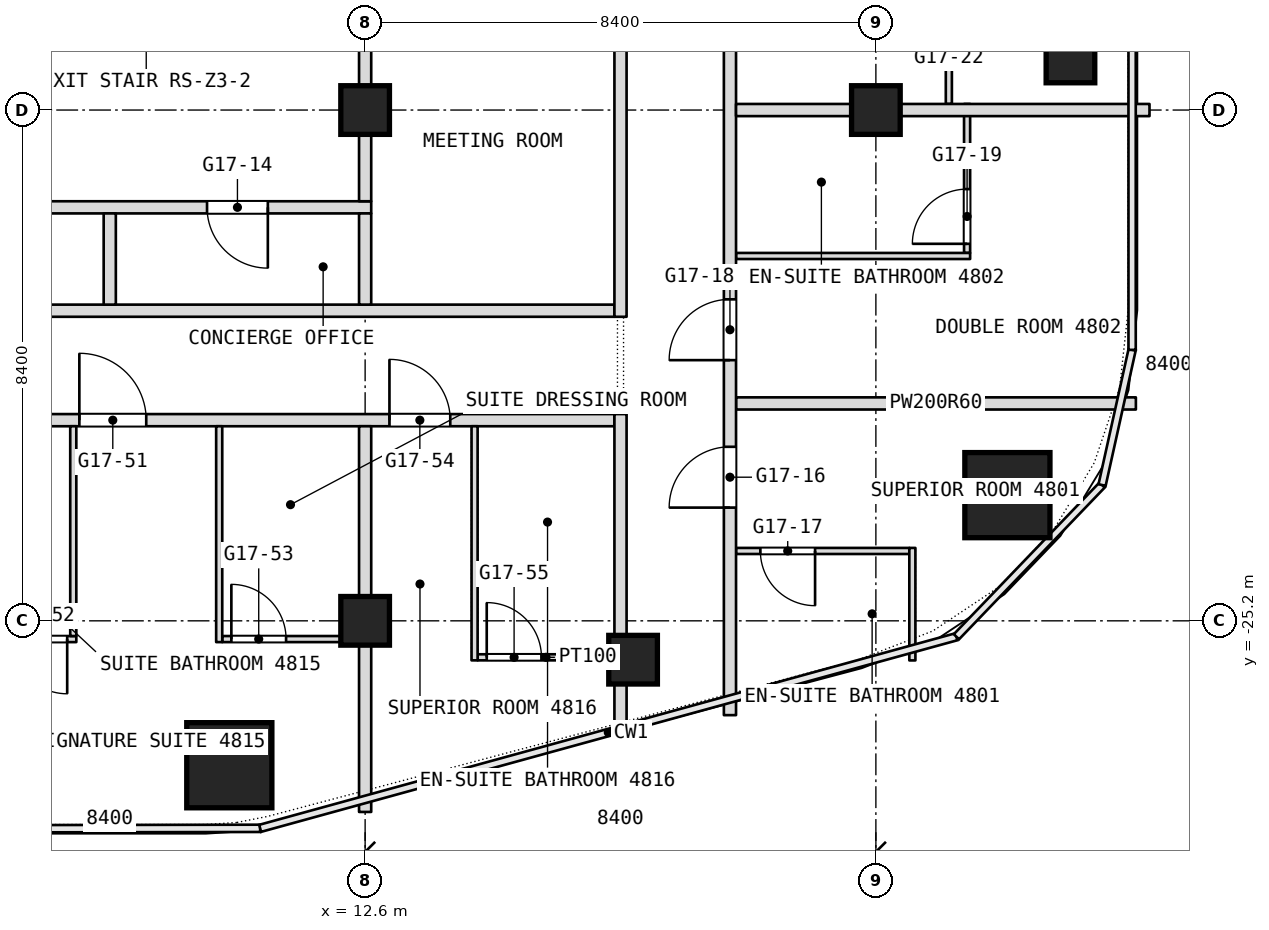
"""IFC4 building model, lengths in metres.
Left out: names, types, materials, properties, quantities, classifications, styles, units other than length and angle.
Written with IfcOpenShell. Run it as: python <this file> out.ifc"""

import sys

from ifc_helpers import new_model, si_unit, direction, frame, frame_2d, origin, origin_2d, place, context, subcontext, project, spatial, rectangle, extrude, element, fill, save


model = new_model("IFC4")
c1 = context("Model", 3, precision=1e-05, world=origin(), true_north=direction((0.0, 1.0)))
c2 = subcontext(c1, "Body", "Model", "MODEL_VIEW")
j1 = project(units=[si_unit("LENGTHUNIT", "METRE"), si_unit("PLANEANGLEUNIT", "RADIAN")], contexts=[c1])
p1 = place(None, origin())
s1 = spatial("IfcSite", under=j1, at=p1, CompositionType="ELEMENT")
p2 = place(p1, origin())
s2 = spatial("IfcBuilding", under=s1, at=p2, CompositionType="ELEMENT")
p3 = place(p2, frame((0.0, 0.0, 209.3)))
s3 = spatial("IfcBuildingStorey", under=s2, at=p3, CompositionType="ELEMENT", Elevation=209.3)
for number, where, z_axis, x_axis in (
    (1, (10.366, -27.575, 0.0), (0.0, 0.0, 1.0), (1.0, 0.0, 0.0)),
    (2, (23.163, -23.133, 0.0), (0.0, 0.0, 1.0), (1.0, 0.0, 0.0)),
):
    element("IfcColumn", number, at=place(p3, frame(where, z_axis=z_axis, x_axis=x_axis)), inside=s3, PredefinedType="COLUMN", context=c2, shape_type="SweptSolid", body=[
        extrude(rectangle(XDim=1.4, YDim=1.4, at=origin_2d()), origin(), (0.0, 0.0, 1.0), 3.6),
    ])
for number, where, z_axis, x_axis in (
    (3, (12.6, -25.2, 0.0), (0.0, 0.0, 1.0), (1.0, 0.0, 0.0)),
    (4, (12.6, -16.8, 0.0), (0.0, 0.0, 1.0), (1.0, 0.0, 0.0)),
    (5, (21.0, -16.8, 0.0), (0.0, 0.0, 1.0), (1.0, 0.0, 0.0)),
    (6, (24.2, -15.952, 0.0), (0.0, 0.0, 1.0), (1.0, 0.0, 0.0)),
    (7, (17.007, -25.839, 0.0), (0.0, 0.0, 1.0), (1.0, 0.0, 0.0)),
):
    element("IfcColumn", number, at=place(p3, frame(where, z_axis=z_axis, x_axis=x_axis)), inside=s3, PredefinedType="COLUMN", context=c2, shape_type="SweptSolid", body=[
        extrude(rectangle(XDim=0.8, YDim=0.8, at=origin_2d()), origin(), (0.0, 0.0, 1.0), 3.6),
    ])
p4 = place(p3, frame((14.45, -25.8, 0.0), z_axis=(0.0, 0.0, 1.0), x_axis=(1.0, 0.0, 0.0)))
e8 = element("IfcWall", 8, at=p4, inside=s3, PredefinedType="PARTITIONING", context=c2, shape_type="SweptSolid", body=[
    extrude(rectangle(XDim=2.25, YDim=0.1, at=frame_2d((1.125, 0.0))), origin(), (0.0, 0.0, 1.0), 3.34),
])
p5 = place(p4, frame((0.15, 0.0, 0.0)))
e9 = element("IfcOpeningElement", 9, at=p5, cuts=e8, PredefinedType="OPENING", context=c2, shape_type="SweptSolid", body=[
    extrude(rectangle(XDim=0.9, YDim=2.1, at=frame_2d((0.45, 1.05))), frame((0.0, 0.05, 0.0), z_axis=(0.0, -1.0, 0.0), x_axis=(1.0, 0.0, 0.0)), (0.0, 0.0, 1.0), 0.1),
])
p6 = place(p3, frame((4.3, -25.5, 0.0), z_axis=(0.0, 0.0, 1.0), x_axis=(1.0, 0.0, 0.0)))
e10 = element("IfcWall", 10, at=p6, inside=s3, PredefinedType="PARTITIONING", context=c2, shape_type="SweptSolid", body=[
    extrude(rectangle(XDim=3.55, YDim=0.1, at=frame_2d((1.775, 0.0))), origin(), (0.0, 0.0, 1.0), 3.34),
])
p7 = place(p6, frame((2.5, 0.0, 0.0)))
e11 = element("IfcOpeningElement", 11, at=p7, cuts=e10, PredefinedType="OPENING", context=c2, shape_type="SweptSolid", body=[
    extrude(rectangle(XDim=0.9, YDim=2.1, at=frame_2d((0.45, 1.05))), frame((0.0, 0.05, 0.0), z_axis=(0.0, -1.0, 0.0), x_axis=(1.0, 0.0, 0.0)), (0.0, 0.0, 1.0), 0.1),
])
p8 = place(p3, frame((10.25, -25.5, 0.0), z_axis=(0.0, 0.0, 1.0), x_axis=(1.0, 0.0, 0.0)))
e12 = element("IfcWall", 12, at=p8, inside=s3, PredefinedType="PARTITIONING", context=c2, shape_type="SweptSolid", body=[
    extrude(rectangle(XDim=2.45, YDim=0.1, at=frame_2d((1.225, 0.0))), origin(), (0.0, 0.0, 1.0), 3.34),
])
p9 = place(p8, frame((0.15, 0.0, 0.0)))
e13 = element("IfcOpeningElement", 13, at=p9, cuts=e12, PredefinedType="OPENING", context=c2, shape_type="SweptSolid", body=[
    extrude(rectangle(XDim=0.9, YDim=2.1, at=frame_2d((0.45, 1.05))), frame((0.0, 0.05, 0.0), z_axis=(0.0, -1.0, 0.0), x_axis=(1.0, 0.0, 0.0)), (0.0, 0.0, 1.0), 0.1),
])
p10 = place(p3, frame((18.7, -24.051, 0.0), z_axis=(0.0, 0.0, 1.0), x_axis=(1.0, 0.0, 0.0)))
e14 = element("IfcWall", 14, at=p10, inside=s3, PredefinedType="PARTITIONING", context=c2, shape_type="SweptSolid", body=[
    extrude(rectangle(XDim=2.85, YDim=0.1, at=frame_2d((1.425, 0.0))), origin(), (0.0, 0.0, 1.0), 3.34),
])
p11 = place(p10, frame((0.4, 0.0, 0.0)))
e15 = element("IfcOpeningElement", 15, at=p11, cuts=e14, PredefinedType="OPENING", context=c2, shape_type="SweptSolid", body=[
    extrude(rectangle(XDim=0.9, YDim=2.1, at=frame_2d((0.45, 1.05))), frame((0.0, 0.05, 0.0), z_axis=(0.0, -1.0, 0.0), x_axis=(1.0, 0.0, 0.0)), (0.0, 0.0, 1.0), 0.1),
])
p12 = place(p3, frame((22.5, -19.15, 0.0), z_axis=(0.0, 0.0, 1.0), x_axis=(0.0, 1.0, 0.0)))
e16 = element("IfcWall", 16, at=p12, inside=s3, PredefinedType="PARTITIONING", context=c2, shape_type="SweptSolid", body=[
    extrude(rectangle(XDim=2.45, YDim=0.1, at=frame_2d((1.225, 0.0))), origin(), (0.0, 0.0, 1.0), 3.34),
])
p13 = place(p12, frame((0.15, 0.0, 0.0)))
e17 = element("IfcOpeningElement", 17, at=p13, cuts=e16, PredefinedType="OPENING", context=c2, shape_type="SweptSolid", body=[
    extrude(rectangle(XDim=0.9, YDim=2.1, at=frame_2d((0.45, 1.05))), frame((0.0, 0.05, 0.0), z_axis=(0.0, -1.0, 0.0), x_axis=(1.0, 0.0, 0.0)), (0.0, 0.0, 1.0), 0.1),
])
p14 = place(p3, frame((22.2, -16.7, 0.0), z_axis=(0.0, 0.0, 1.0), x_axis=(0.0, 1.0, 0.0)))
e18 = element("IfcWall", 18, at=p14, inside=s3, PredefinedType="PARTITIONING", context=c2, shape_type="SweptSolid", body=[
    extrude(rectangle(XDim=2.35, YDim=0.1, at=frame_2d((1.175, 0.0))), origin(), (0.0, 0.0, 1.0), 3.34),
])
p15 = place(p14, frame((1.3, 0.0, 0.0)))
e19 = element("IfcOpeningElement", 19, at=p15, cuts=e18, PredefinedType="OPENING", context=c2, shape_type="SweptSolid", body=[
    extrude(rectangle(XDim=0.9, YDim=2.1, at=frame_2d((0.45, 1.05))), frame((0.0, 0.05, 0.0), z_axis=(0.0, -1.0, 0.0), x_axis=(1.0, 0.0, 0.0)), (0.0, 0.0, 1.0), 0.1),
])
p16 = place(p3, frame((-16.7, -21.9, 0.0), z_axis=(0.0, 0.0, 1.0), x_axis=(1.0, 0.0, 0.0)))
e20 = element("IfcWall", 20, at=p16, inside=s3, PredefinedType="PARTITIONING", context=c2, shape_type="SweptSolid", body=[
    extrude(rectangle(XDim=33.4, YDim=0.2, at=frame_2d((16.7, 0.0))), origin(), (0.0, 0.0, 1.0), 3.34),
])
p17 = place(p16, frame((0.3, 0.0, 0.0)))
e21 = element("IfcOpeningElement", 21, at=p17, cuts=e20, PredefinedType="OPENING", context=c2, shape_type="SweptSolid", body=[
    extrude(rectangle(XDim=1.0, YDim=2.1, at=frame_2d((0.5, 1.05))), frame((0.0, 0.1, 0.0), z_axis=(0.0, -1.0, 0.0), x_axis=(1.0, 0.0, 0.0)), (0.0, 0.0, 1.0), 0.2),
])
p18 = place(p16, frame((6.9, 0.0, 0.0)))
e22 = element("IfcOpeningElement", 22, at=p18, cuts=e20, PredefinedType="OPENING", context=c2, shape_type="SweptSolid", body=[
    extrude(rectangle(XDim=1.0, YDim=2.1, at=frame_2d((0.5, 1.05))), frame((0.0, 0.1, 0.0), z_axis=(0.0, -1.0, 0.0), x_axis=(1.0, 0.0, 0.0)), (0.0, 0.0, 1.0), 0.2),
])
p19 = place(p16, frame((8.7, 0.0, 0.0)))
e23 = element("IfcOpeningElement", 23, at=p19, cuts=e20, PredefinedType="OPENING", context=c2, shape_type="SweptSolid", body=[
    extrude(rectangle(XDim=1.0, YDim=2.1, at=frame_2d((0.5, 1.05))), frame((0.0, 0.1, 0.0), z_axis=(0.0, -1.0, 0.0), x_axis=(1.0, 0.0, 0.0)), (0.0, 0.0, 1.0), 0.2),
])
p20 = place(p16, frame((12.9, 0.0, 0.0)))
e24 = element("IfcOpeningElement", 24, at=p20, cuts=e20, PredefinedType="OPENING", context=c2, shape_type="SweptSolid", body=[
    extrude(rectangle(XDim=1.0, YDim=2.1, at=frame_2d((0.5, 1.05))), frame((0.0, 0.1, 0.0), z_axis=(0.0, -1.0, 0.0), x_axis=(1.0, 0.0, 0.0)), (0.0, 0.0, 1.0), 0.2),
])
p21 = place(p16, frame((19.5, 0.0, 0.0)))
e25 = element("IfcOpeningElement", 25, at=p21, cuts=e20, PredefinedType="OPENING", context=c2, shape_type="SweptSolid", body=[
    extrude(rectangle(XDim=1.0, YDim=2.1, at=frame_2d((0.5, 1.05))), frame((0.0, 0.1, 0.0), z_axis=(0.0, -1.0, 0.0), x_axis=(1.0, 0.0, 0.0)), (0.0, 0.0, 1.0), 0.2),
])
p22 = place(p16, frame((24.6, 0.0, 0.0)))
e26 = element("IfcOpeningElement", 26, at=p22, cuts=e20, PredefinedType="OPENING", context=c2, shape_type="SweptSolid", body=[
    extrude(rectangle(XDim=1.1, YDim=2.1, at=frame_2d((0.55, 1.05))), frame((0.0, 0.1, 0.0), z_axis=(0.0, -1.0, 0.0), x_axis=(1.0, 0.0, 0.0)), (0.0, 0.0, 1.0), 0.2),
])
p23 = place(p16, frame((29.7, 0.0, 0.0)))
e27 = element("IfcOpeningElement", 27, at=p23, cuts=e20, PredefinedType="OPENING", context=c2, shape_type="SweptSolid", body=[
    extrude(rectangle(XDim=1.0, YDim=2.1, at=frame_2d((0.5, 1.05))), frame((0.0, 0.1, 0.0), z_axis=(0.0, -1.0, 0.0), x_axis=(1.0, 0.0, 0.0)), (0.0, 0.0, 1.0), 0.2),
])
p24 = place(p3, frame((18.7, -21.625, 0.0), z_axis=(0.0, 0.0, 1.0), x_axis=(1.0, 0.0, 0.0)))
e28 = element("IfcWall", 28, at=p24, inside=s3, PredefinedType="PARTITIONING", context=c2, shape_type="SweptSolid", body=[
    extrude(rectangle(XDim=6.576, YDim=0.2, at=frame_2d((3.288, 0.0))), origin(), (0.0, 0.0, 1.0), 3.34),
])
p25 = place(p3, frame((21.6, -25.851, 0.0), z_axis=(0.0, 0.0, 1.0), x_axis=(0.0, 1.0, 0.0)))
e29 = element("IfcWall", 29, at=p25, inside=s3, PredefinedType="PARTITIONING", context=c2, shape_type="SweptSolid", body=[
    extrude(rectangle(XDim=1.85, YDim=0.1, at=frame_2d((0.925, 0.0))), origin(), (0.0, 0.0, 1.0), 3.34),
])
p26 = place(p3, frame((-4.1, -20.1, 0.0), z_axis=(0.0, 0.0, 1.0), x_axis=(1.0, 0.0, 0.0)))
e30 = element("IfcWall", 30, at=p26, inside=s3, PredefinedType="PARTITIONING", context=c2, shape_type="SweptSolid", body=[
    extrude(rectangle(XDim=20.8, YDim=0.2, at=frame_2d((10.4, 0.0))), origin(), (0.0, 0.0, 1.0), 3.34),
])
p27 = place(p3, frame((18.7, -19.2, 0.0), z_axis=(0.0, 0.0, 1.0), x_axis=(1.0, 0.0, 0.0)))
e31 = element("IfcWall", 31, at=p27, inside=s3, PredefinedType="PARTITIONING", context=c2, shape_type="SweptSolid", body=[
    extrude(rectangle(XDim=3.85, YDim=0.1, at=frame_2d((1.925, 0.0))), origin(), (0.0, 0.0, 1.0), 3.34),
])
p28 = place(p3, frame((18.6, -26.751, 0.0), z_axis=(0.0, 0.0, 1.0), x_axis=(0.0, 1.0, 0.0)))
e32 = element("IfcWall", 32, at=p28, inside=s3, PredefinedType="PARTITIONING", context=c2, shape_type="SweptSolid", body=[
    extrude(rectangle(XDim=49.091, YDim=0.2, at=frame_2d((24.545, 0.0))), origin(), (0.0, 0.0, 1.0), 3.34),
])
p29 = place(p28, frame((3.413, 0.0, 0.0)))
e33 = element("IfcOpeningElement", 33, at=p29, cuts=e32, PredefinedType="OPENING", context=c2, shape_type="SweptSolid", body=[
    extrude(rectangle(XDim=1.0, YDim=2.1, at=frame_2d((0.5, 1.05))), frame((0.0, 0.1, 0.0), z_axis=(0.0, -1.0, 0.0), x_axis=(1.0, 0.0, 0.0)), (0.0, 0.0, 1.0), 0.2),
])
p30 = place(p28, frame((5.838, 0.0, 0.0)))
e34 = element("IfcOpeningElement", 34, at=p30, cuts=e32, PredefinedType="OPENING", context=c2, shape_type="SweptSolid", body=[
    extrude(rectangle(XDim=1.0, YDim=2.1, at=frame_2d((0.5, 1.05))), frame((0.0, 0.1, 0.0), z_axis=(0.0, -1.0, 0.0), x_axis=(1.0, 0.0, 0.0)), (0.0, 0.0, 1.0), 0.2),
])
p31 = place(p28, frame((13.551, 0.0, 0.0)))
e35 = element("IfcOpeningElement", 35, at=p31, cuts=e32, PredefinedType="OPENING", context=c2, shape_type="SweptSolid", body=[
    extrude(rectangle(XDim=1.1, YDim=2.1, at=frame_2d((0.55, 1.05))), frame((0.0, 0.1, 0.0), z_axis=(0.0, -1.0, 0.0), x_axis=(1.0, 0.0, 0.0)), (0.0, 0.0, 1.0), 0.2),
])
p32 = place(p28, frame((21.151, 0.0, 0.0)))
e36 = element("IfcOpeningElement", 36, at=p32, cuts=e32, PredefinedType="OPENING", context=c2, shape_type="SweptSolid", body=[
    extrude(rectangle(XDim=1.0, YDim=2.1, at=frame_2d((0.5, 1.05))), frame((0.0, 0.1, 0.0), z_axis=(0.0, -1.0, 0.0), x_axis=(1.0, 0.0, 0.0)), (0.0, 0.0, 1.0), 0.2),
])
p33 = place(p28, frame((22.951, 0.0, 0.0)))
e37 = element("IfcOpeningElement", 37, at=p33, cuts=e32, PredefinedType="OPENING", context=c2, shape_type="SweptSolid", body=[
    extrude(rectangle(XDim=1.0, YDim=2.1, at=frame_2d((0.5, 1.05))), frame((0.0, 0.1, 0.0), z_axis=(0.0, -1.0, 0.0), x_axis=(1.0, 0.0, 0.0)), (0.0, 0.0, 1.0), 0.2),
])
p34 = place(p28, frame((30.351, 0.0, 0.0)))
e38 = element("IfcOpeningElement", 38, at=p34, cuts=e32, PredefinedType="OPENING", context=c2, shape_type="SweptSolid", body=[
    extrude(rectangle(XDim=1.1, YDim=2.1, at=frame_2d((0.55, 1.05))), frame((0.0, 0.1, 0.0), z_axis=(0.0, -1.0, 0.0), x_axis=(1.0, 0.0, 0.0)), (0.0, 0.0, 1.0), 0.2),
])
p35 = place(p28, frame((37.951, 0.0, 0.0)))
e39 = element("IfcOpeningElement", 39, at=p35, cuts=e32, PredefinedType="OPENING", context=c2, shape_type="SweptSolid", body=[
    extrude(rectangle(XDim=1.0, YDim=2.1, at=frame_2d((0.5, 1.05))), frame((0.0, 0.1, 0.0), z_axis=(0.0, -1.0, 0.0), x_axis=(1.0, 0.0, 0.0)), (0.0, 0.0, 1.0), 0.2),
])
p36 = place(p28, frame((39.751, 0.0, 0.0)))
e40 = element("IfcOpeningElement", 40, at=p36, cuts=e32, PredefinedType="OPENING", context=c2, shape_type="SweptSolid", body=[
    extrude(rectangle(XDim=1.0, YDim=2.1, at=frame_2d((0.5, 1.05))), frame((0.0, 0.1, 0.0), z_axis=(0.0, -1.0, 0.0), x_axis=(1.0, 0.0, 0.0)), (0.0, 0.0, 1.0), 0.2),
])
p37 = place(p28, frame((44.051, 0.0, 0.0)))
e41 = element("IfcOpeningElement", 41, at=p37, cuts=e32, PredefinedType="OPENING", context=c2, shape_type="SweptSolid", body=[
    extrude(rectangle(XDim=1.0, YDim=2.1, at=frame_2d((0.5, 1.05))), frame((0.0, 0.1, 0.0), z_axis=(0.0, -1.0, 0.0), x_axis=(1.0, 0.0, 0.0)), (0.0, 0.0, 1.0), 0.2),
])
p38 = place(p3, frame((5.7, -18.4, 0.0), z_axis=(0.0, 0.0, 1.0), x_axis=(1.0, 0.0, 0.0)))
e42 = element("IfcWall", 42, at=p38, inside=s3, PredefinedType="PARTITIONING", context=c2, shape_type="SweptSolid", body=[
    extrude(rectangle(XDim=7.0, YDim=0.2, at=frame_2d((3.5, 0.0))), origin(), (0.0, 0.0, 1.0), 3.34),
])
p39 = place(p38, frame((4.3, 0.0, 0.0)))
e43 = element("IfcOpeningElement", 43, at=p39, cuts=e42, PredefinedType="OPENING", context=c2, shape_type="SweptSolid", body=[
    extrude(rectangle(XDim=1.0, YDim=2.1, at=frame_2d((0.5, 1.05))), frame((0.0, 0.1, 0.0), z_axis=(0.0, -1.0, 0.0), x_axis=(1.0, 0.0, 0.0)), (0.0, 0.0, 1.0), 0.2),
])
p40 = place(p3, frame((16.8, -27.229, 0.0), z_axis=(0.0, 0.0, 1.0), x_axis=(0.0, 1.0, 0.0)))
e44 = element("IfcWall", 44, at=p40, inside=s3, PredefinedType="PARTITIONING", context=c2, shape_type="SweptSolid", body=[
    extrude(rectangle(XDim=5.429, YDim=0.2, at=frame_2d((2.714, 0.0))), origin(), (0.0, 0.0, 1.0), 3.34),
])
p41 = place(p3, frame((16.8, -20.2, 0.0), z_axis=(0.0, 0.0, 1.0), x_axis=(0.0, 1.0, 0.0)))
e45 = element("IfcWall", 45, at=p41, inside=s3, PredefinedType="PARTITIONING", context=c2, shape_type="SweptSolid", body=[
    extrude(rectangle(XDim=6.8, YDim=0.2, at=frame_2d((3.4, 0.0))), origin(), (0.0, 0.0, 1.0), 3.34),
])
p42 = place(p3, frame((18.7, -16.8, 0.0), z_axis=(0.0, 0.0, 1.0), x_axis=(1.0, 0.0, 0.0)))
e46 = element("IfcWall", 46, at=p42, inside=s3, PredefinedType="PARTITIONING", context=c2, shape_type="SweptSolid", body=[
    extrude(rectangle(XDim=6.8, YDim=0.2, at=frame_2d((3.4, 0.0))), origin(), (0.0, 0.0, 1.0), 2.94),
])
p43 = place(p3, frame((14.4, -25.85, 0.0), z_axis=(0.0, 0.0, 1.0), x_axis=(0.0, 1.0, 0.0)))
e47 = element("IfcWall", 47, at=p43, inside=s3, PredefinedType="PARTITIONING", context=c2, shape_type="SweptSolid", body=[
    extrude(rectangle(XDim=3.85, YDim=0.1, at=frame_2d((1.925, 0.0))), origin(), (0.0, 0.0, 1.0), 3.34),
])
p44 = place(p3, frame((12.6, -28.343, 0.0), z_axis=(0.0, 0.0, 1.0), x_axis=(0.0, 1.0, 0.0)))
e48 = element("IfcWall", 48, at=p44, inside=s3, PredefinedType="PARTITIONING", context=c2, shape_type="SweptSolid", body=[
    extrude(rectangle(XDim=6.343, YDim=0.2, at=frame_2d((3.171, 0.0))), origin(), (0.0, 0.0, 1.0), 3.34),
])
p45 = place(p3, frame((12.6, -20.0, 0.0), z_axis=(0.0, 0.0, 1.0), x_axis=(0.0, 1.0, 0.0)))
e49 = element("IfcWall", 49, at=p45, inside=s3, PredefinedType="PARTITIONING", context=c2, shape_type="SweptSolid", body=[
    extrude(rectangle(XDim=1.5, YDim=0.2, at=frame_2d((0.75, 0.0))), origin(), (0.0, 0.0, 1.0), 3.34),
])
p46 = place(p3, frame((12.6, -18.3, 0.0), z_axis=(0.0, 0.0, 1.0), x_axis=(0.0, 1.0, 0.0)))
e50 = element("IfcWall", 50, at=p46, inside=s3, PredefinedType="PARTITIONING", context=c2, shape_type="SweptSolid", body=[
    extrude(rectangle(XDim=4.7, YDim=0.2, at=frame_2d((2.35, 0.0))), origin(), (0.0, 0.0, 1.0), 3.34),
])
p47 = place(p3, frame((10.2, -25.55, 0.0), z_axis=(0.0, 0.0, 1.0), x_axis=(0.0, 1.0, 0.0)))
e51 = element("IfcWall", 51, at=p47, inside=s3, PredefinedType="PARTITIONING", context=c2, shape_type="SweptSolid", body=[
    extrude(rectangle(XDim=3.55, YDim=0.1, at=frame_2d((1.775, 0.0))), origin(), (0.0, 0.0, 1.0), 3.34),
])
p48 = place(p3, frame((8.4, -20.0, 0.0), z_axis=(0.0, 0.0, 1.0), x_axis=(0.0, 1.0, 0.0)))
e52 = element("IfcWall", 52, at=p48, inside=s3, PredefinedType="PARTITIONING", context=c2, shape_type="SweptSolid", body=[
    extrude(rectangle(XDim=1.5, YDim=0.2, at=frame_2d((0.75, 0.0))), origin(), (0.0, 0.0, 1.0), 3.34),
])
p49 = place(p3, frame((7.8, -25.45, 0.0), z_axis=(0.0, 0.0, 1.0), x_axis=(0.0, 1.0, 0.0)))
e53 = element("IfcWall", 53, at=p49, inside=s3, PredefinedType="PARTITIONING", context=c2, shape_type="SweptSolid", body=[
    extrude(rectangle(XDim=3.45, YDim=0.1, at=frame_2d((1.725, 0.0))), origin(), (0.0, 0.0, 1.0), 3.34),
])
p50 = place(p5, origin())
e54 = element("IfcDoor", 54, at=p50, inside=s3, OperationType="SINGLE_SWING_LEFT", PredefinedType="DOOR", context=c2, shape_type="SweptSolid", body=[
    extrude(rectangle(XDim=0.9, YDim=2.1, at=frame_2d((0.45, 1.05))), frame((0.0, 0.025, 0.0), z_axis=(0.0, -1.0, 0.0), x_axis=(1.0, 0.0, 0.0)), (0.0, 0.0, 1.0), 0.05),
])
fill(e9, e54)
p51 = place(p7, origin())
e55 = element("IfcDoor", 55, at=p51, inside=s3, OperationType="SINGLE_SWING_RIGHT", PredefinedType="DOOR", context=c2, shape_type="SweptSolid", body=[
    extrude(rectangle(XDim=0.9, YDim=2.1, at=frame_2d((0.45, 1.05))), frame((0.0, 0.025, 0.0), z_axis=(0.0, -1.0, 0.0), x_axis=(1.0, 0.0, 0.0)), (0.0, 0.0, 1.0), 0.05),
])
fill(e11, e55)
p52 = place(p9, origin())
e56 = element("IfcDoor", 56, at=p52, inside=s3, OperationType="SINGLE_SWING_LEFT", PredefinedType="DOOR", context=c2, shape_type="SweptSolid", body=[
    extrude(rectangle(XDim=0.9, YDim=2.1, at=frame_2d((0.45, 1.05))), frame((0.0, 0.025, 0.0), z_axis=(0.0, -1.0, 0.0), x_axis=(1.0, 0.0, 0.0)), (0.0, 0.0, 1.0), 0.05),
])
fill(e13, e56)
p53 = place(p11, origin())
e57 = element("IfcDoor", 57, at=p53, inside=s3, OperationType="SINGLE_SWING_RIGHT", PredefinedType="DOOR", context=c2, shape_type="SweptSolid", body=[
    extrude(rectangle(XDim=0.9, YDim=2.1, at=frame_2d((0.45, 1.05))), frame((0.0, 0.025, 0.0), z_axis=(0.0, -1.0, 0.0), x_axis=(1.0, 0.0, 0.0)), (0.0, 0.0, 1.0), 0.05),
])
fill(e15, e57)
p54 = place(p13, origin())
e58 = element("IfcDoor", 58, at=p54, inside=s3, OperationType="SINGLE_SWING_LEFT", PredefinedType="DOOR", context=c2, shape_type="SweptSolid", body=[
    extrude(rectangle(XDim=0.9, YDim=2.1, at=frame_2d((0.45, 1.05))), frame((0.0, 0.025, 0.0), z_axis=(0.0, -1.0, 0.0), x_axis=(1.0, 0.0, 0.0)), (0.0, 0.0, 1.0), 0.05),
])
fill(e17, e58)
p55 = place(p22, origin())
e59 = element("IfcDoor", 59, at=p55, inside=s3, OperationType="SINGLE_SWING_RIGHT", PredefinedType="DOOR", context=c2, shape_type="SweptSolid", body=[
    extrude(rectangle(XDim=1.1, YDim=2.1, at=frame_2d((0.55, 1.05))), frame((0.0, 0.025, 0.0), z_axis=(0.0, -1.0, 0.0), x_axis=(1.0, 0.0, 0.0)), (0.0, 0.0, 1.0), 0.05),
])
fill(e26, e59)
p56 = place(p23, origin())
e60 = element("IfcDoor", 60, at=p56, inside=s3, OperationType="SINGLE_SWING_RIGHT", PredefinedType="DOOR", context=c2, shape_type="SweptSolid", body=[
    extrude(rectangle(XDim=1.0, YDim=2.1, at=frame_2d((0.5, 1.05))), frame((0.0, 0.025, 0.0), z_axis=(0.0, -1.0, 0.0), x_axis=(1.0, 0.0, 0.0)), (0.0, 0.0, 1.0), 0.05),
])
fill(e27, e60)
p57 = place(p29, origin())
e61 = element("IfcDoor", 61, at=p57, inside=s3, OperationType="SINGLE_SWING_RIGHT", PredefinedType="DOOR", context=c2, shape_type="SweptSolid", body=[
    extrude(rectangle(XDim=1.0, YDim=2.1, at=frame_2d((0.5, 1.05))), frame((0.0, 0.025, 0.0), z_axis=(0.0, -1.0, 0.0), x_axis=(1.0, 0.0, 0.0)), (0.0, 0.0, 1.0), 0.05),
])
fill(e33, e61)
p58 = place(p30, origin())
e62 = element("IfcDoor", 62, at=p58, inside=s3, OperationType="SINGLE_SWING_RIGHT", PredefinedType="DOOR", context=c2, shape_type="SweptSolid", body=[
    extrude(rectangle(XDim=1.0, YDim=2.1, at=frame_2d((0.5, 1.05))), frame((0.0, 0.025, 0.0), z_axis=(0.0, -1.0, 0.0), x_axis=(1.0, 0.0, 0.0)), (0.0, 0.0, 1.0), 0.05),
])
fill(e34, e62)
p59 = place(p39, origin())
e63 = element("IfcDoor", 63, at=p59, inside=s3, OperationType="SINGLE_SWING_LEFT", PredefinedType="DOOR", context=c2, shape_type="SweptSolid", body=[
    extrude(rectangle(XDim=1.0, YDim=2.1, at=frame_2d((0.5, 1.05))), frame((0.0, 0.025, 0.0), z_axis=(0.0, -1.0, 0.0), x_axis=(1.0, 0.0, 0.0)), (0.0, 0.0, 1.0), 0.05),
])
fill(e43, e63)
save(model, sys.argv[1])
